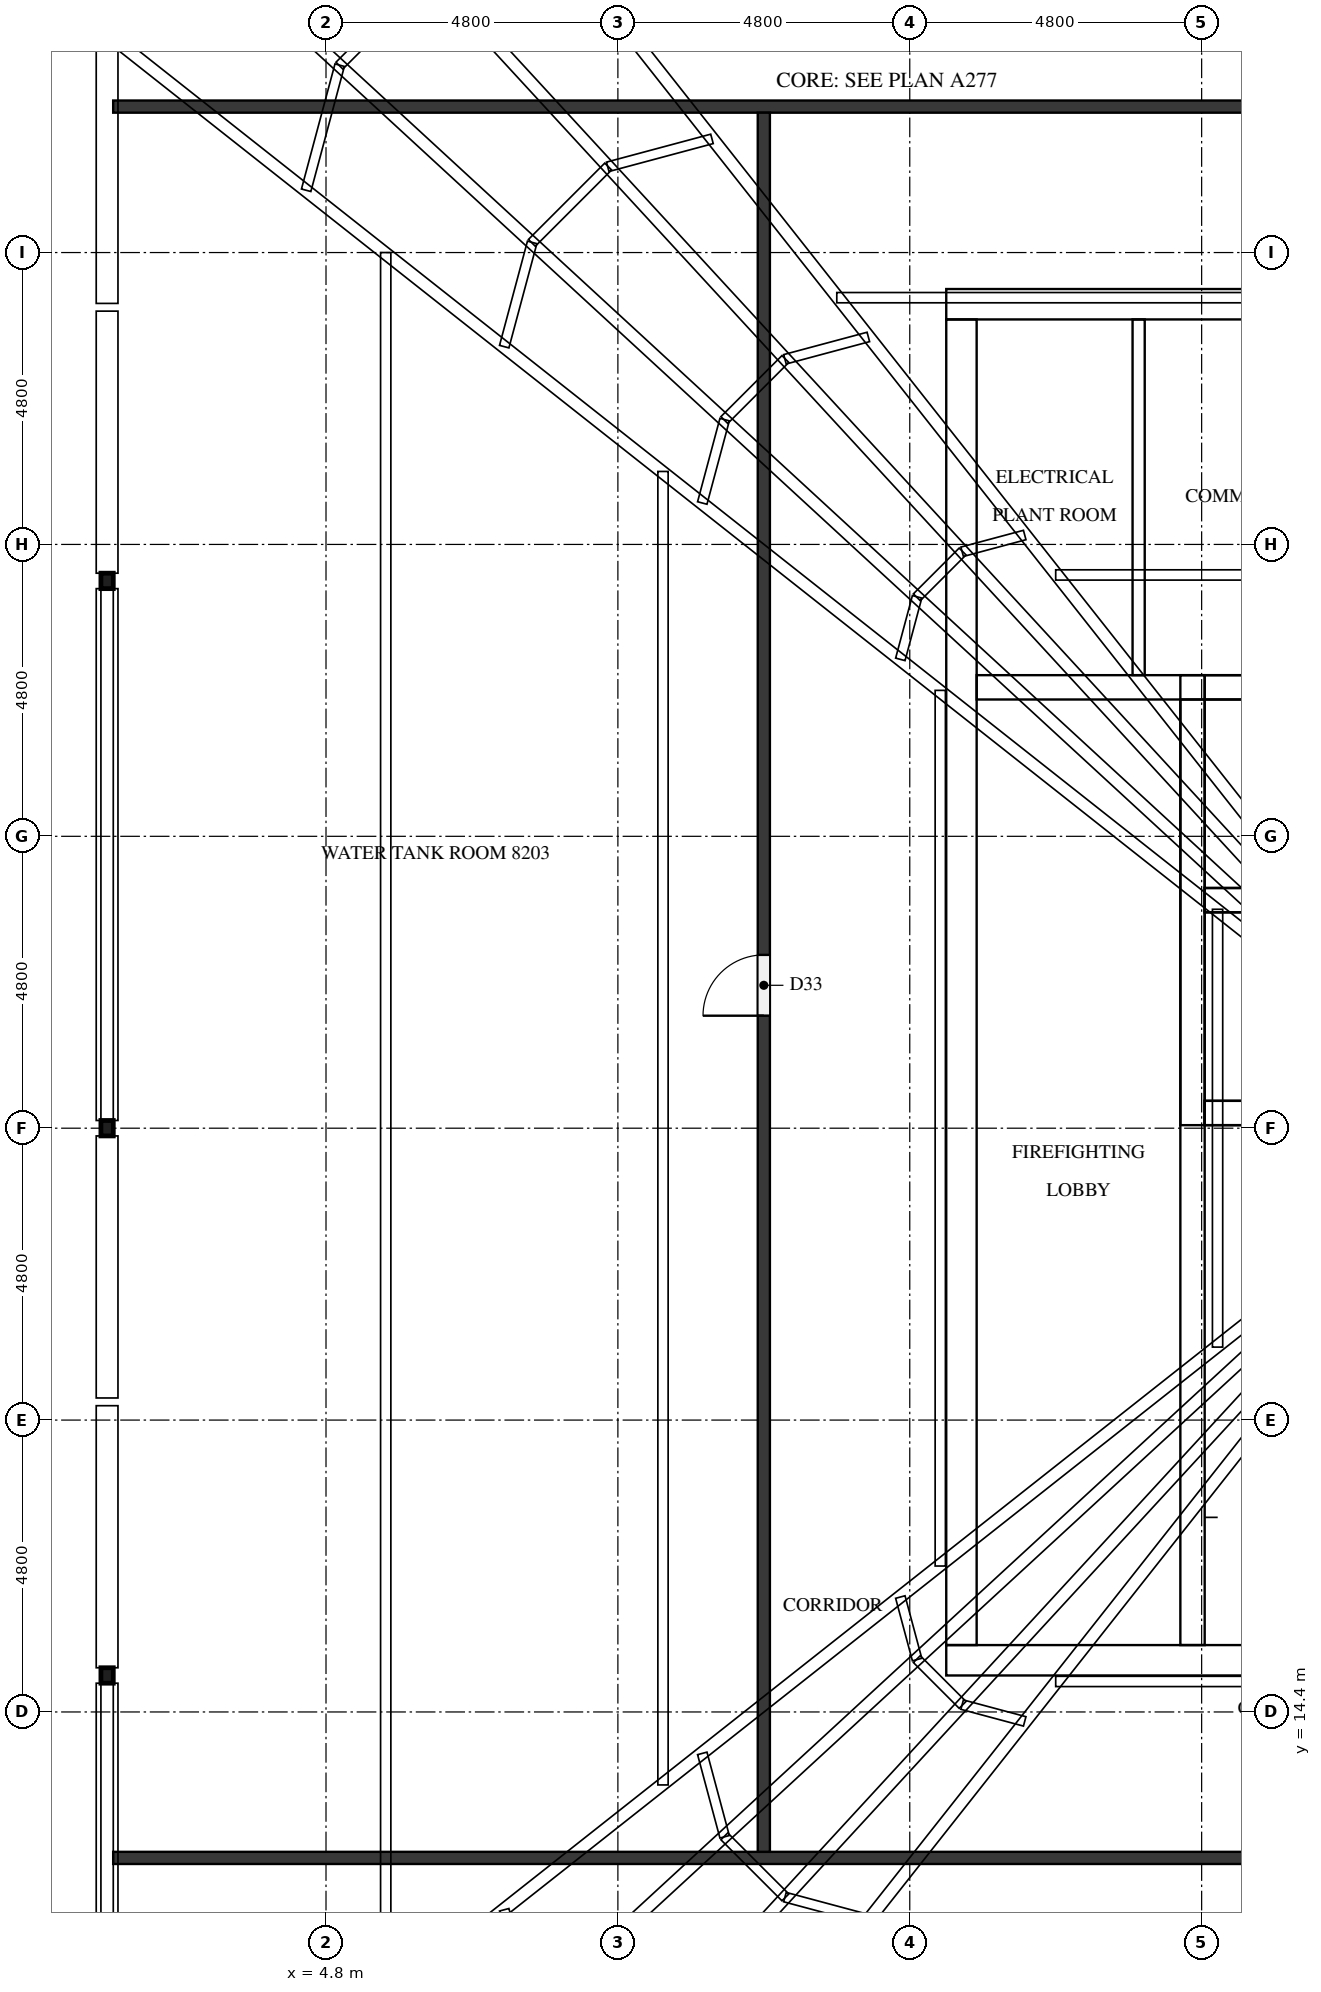
"""IFC4 building model, lengths in metres.
Left out: names, types, materials, properties, quantities, classifications, styles, units other than length and angle.
Written with IfcOpenShell. Run it as: python <this file> out.ifc"""

import sys

from ifc_helpers import new_model, si_unit, direction, frame, frame_2d, origin, origin_2d, place, context, subcontext, project, spatial, rectangle, hollow_rectangle, extrude, element, fill, save


model = new_model("IFC4")
c1 = context("Model", 3, precision=1e-05, world=origin(), true_north=direction((0.0, 1.0)))
c2 = subcontext(c1, "Body", "Model", "MODEL_VIEW")
j1 = project(units=[si_unit("LENGTHUNIT", "METRE"), si_unit("PLANEANGLEUNIT", "RADIAN")], contexts=[c1])
p1 = place(None, origin())
s1 = spatial("IfcSite", under=j1, at=p1, CompositionType="ELEMENT")
p2 = place(p1, origin())
s2 = spatial("IfcBuilding", under=s1, at=p2, CompositionType="ELEMENT")
p3 = place(p2, frame((0.0, 0.0, 317.3)))
s3 = spatial("IfcBuildingStorey", under=s2, at=p3, CompositionType="ELEMENT", Elevation=317.3)
p4 = place(p3, frame((15.0, 15.25, 0.0), z_axis=(0.0, 0.0, 1.0), x_axis=(1.0, 0.0, 0.0)))
e1 = element("IfcWall", 1, at=p4, inside=s3, PredefinedType="SHEAR", context=c2, shape_type="SweptSolid", body=[
    extrude(rectangle(XDim=32.4, YDim=0.5, at=frame_2d((16.2, 0.0))), origin(), (0.0, 0.0, 1.0), 3.0),
])
p5 = place(p4, frame((15.3, 0.0, 0.0)))
e2 = element("IfcOpeningElement", 2, at=p5, cuts=e1, PredefinedType="OPENING", context=c2, shape_type="SweptSolid", body=[
    extrude(rectangle(XDim=1.8, YDim=2.1, at=frame_2d((0.9, 1.05))), frame((0.0, 0.26, 0.0), z_axis=(0.0, -1.0, 0.0), x_axis=(1.0, 0.0, 0.0)), (0.0, 0.0, 1.0), 0.52),
])
p6 = place(p3, frame((15.0, 37.55, 0.0), z_axis=(0.0, 0.0, 1.0), x_axis=(1.0, 0.0, 0.0)))
e3 = element("IfcWall", 3, at=p6, inside=s3, PredefinedType="SHEAR", context=c2, shape_type="SweptSolid", body=[
    extrude(rectangle(XDim=32.4, YDim=0.5, at=frame_2d((16.2, 0.0))), origin(), (0.0, 0.0, 1.0), 3.0),
])
p7 = place(p6, frame((15.3, 0.0, 0.0)))
e4 = element("IfcOpeningElement", 4, at=p7, cuts=e3, PredefinedType="OPENING", context=c2, shape_type="SweptSolid", body=[
    extrude(rectangle(XDim=1.8, YDim=2.1, at=frame_2d((0.9, 1.05))), frame((0.0, 0.26, 0.0), z_axis=(0.0, -1.0, 0.0), x_axis=(1.0, 0.0, 0.0)), (0.0, 0.0, 1.0), 0.52),
])
p8 = place(p6, frame((1.282, 0.0, 0.0)))
e5 = element("IfcOpeningElement", 5, at=p8, cuts=e3, PredefinedType="OPENING", context=c2, shape_type="SweptSolid", body=[
    extrude(rectangle(XDim=1.0, YDim=2.1, at=frame_2d((0.5, 1.05))), frame((0.0, 0.26, 0.0), z_axis=(0.0, -1.0, 0.0), x_axis=(1.0, 0.0, 0.0)), (0.0, 0.0, 1.0), 0.52),
])
p9 = place(p6, frame((5.082, 0.0, 0.0)))
e6 = element("IfcOpeningElement", 6, at=p9, cuts=e3, PredefinedType="OPENING", context=c2, shape_type="SweptSolid", body=[
    extrude(rectangle(XDim=1.0, YDim=2.1, at=frame_2d((0.5, 1.05))), frame((0.0, 0.26, 0.0), z_axis=(0.0, -1.0, 0.0), x_axis=(1.0, 0.0, 0.0)), (0.0, 0.0, 1.0), 0.52),
])
p10 = place(p3, frame((15.25, 15.5, 0.0), z_axis=(0.0, 0.0, 1.0), x_axis=(0.0, 1.0, 0.0)))
e7 = element("IfcWall", 7, at=p10, inside=s3, PredefinedType="SHEAR", context=c2, shape_type="SweptSolid", body=[
    extrude(rectangle(XDim=21.8, YDim=0.5, at=frame_2d((10.9, 0.0))), origin(), (0.0, 0.0, 1.0), 3.0),
])
p11 = place(p10, frame((5.26, 0.0, 0.0)))
e8 = element("IfcOpeningElement", 8, at=p11, cuts=e7, PredefinedType="OPENING", context=c2, shape_type="SweptSolid", body=[
    extrude(rectangle(XDim=1.2, YDim=2.1, at=frame_2d((0.6, 1.05))), frame((0.0, 0.26, 0.0), z_axis=(0.0, -1.0, 0.0), x_axis=(1.0, 0.0, 0.0)), (0.0, 0.0, 1.0), 0.52),
])
p12 = place(p3, frame((19.05, 15.5, 0.0), z_axis=(0.0, 0.0, 1.0), x_axis=(0.0, 1.0, 0.0)))
e9 = element("IfcWall", 9, at=p12, inside=s3, PredefinedType="SHEAR", context=c2, shape_type="SweptSolid", body=[
    extrude(rectangle(XDim=15.55, YDim=0.4, at=frame_2d((7.775, 0.0))), origin(), (0.0, 0.0, 1.0), 3.0),
])
p13 = place(p12, frame((9.95, 0.0, 0.0)))
e10 = element("IfcOpeningElement", 10, at=p13, cuts=e9, PredefinedType="OPENING", context=c2, shape_type="SweptSolid", body=[
    extrude(rectangle(XDim=1.1, YDim=2.1, at=frame_2d((0.55, 1.05))), frame((0.0, 0.21, 0.0), z_axis=(0.0, -1.0, 0.0), x_axis=(1.0, 0.0, 0.0)), (0.0, 0.0, 1.0), 0.42),
])
p14 = place(p12, frame((13.45, 0.0, 0.0)))
e11 = element("IfcOpeningElement", 11, at=p14, cuts=e9, PredefinedType="OPENING", context=c2, shape_type="SweptSolid", body=[
    extrude(rectangle(XDim=1.1, YDim=2.1, at=frame_2d((0.55, 1.05))), frame((0.0, 0.21, 0.0), z_axis=(0.0, -1.0, 0.0), x_axis=(1.0, 0.0, 0.0)), (0.0, 0.0, 1.0), 0.42),
])
p15 = place(p12, frame((0.7, 0.0, 0.0)))
e12 = element("IfcOpeningElement", 12, at=p15, cuts=e9, PredefinedType="OPENING", context=c2, shape_type="SweptSolid", body=[
    extrude(rectangle(XDim=1.2, YDim=2.1, at=frame_2d((0.6, 1.05))), frame((0.0, 0.21, 0.0), z_axis=(0.0, -1.0, 0.0), x_axis=(1.0, 0.0, 0.0)), (0.0, 0.0, 1.0), 0.42),
])
for number, where, z_axis, x_axis in (
    (13, (19.25, 24.25, 0.0), (0.0, 0.0, 1.0), (1.0, 0.0, 0.0)),
    (14, (19.25, 27.75, 0.0), (0.0, 0.0, 1.0), (1.0, 0.0, 0.0)),
):
    element("IfcWall", number, at=place(p3, frame(where, z_axis=z_axis, x_axis=x_axis)), inside=s3, PredefinedType="SHEAR", context=c2, shape_type="SweptSolid", body=[
        extrude(rectangle(XDim=3.65, YDim=0.4, at=frame_2d((1.825, 0.0))), origin(), (0.0, 0.0, 1.0), 3.0),
    ])
p16 = place(p3, frame((15.5, 31.25, 0.0), z_axis=(0.0, 0.0, 1.0), x_axis=(1.0, 0.0, 0.0)))
e15 = element("IfcWall", 15, at=p16, inside=s3, PredefinedType="SHEAR", context=c2, shape_type="SweptSolid", body=[
    extrude(rectangle(XDim=7.4, YDim=0.4, at=frame_2d((3.7, 0.0))), origin(), (0.0, 0.0, 1.0), 3.0),
])
p17 = place(p3, frame((19.05, 24.05, 3.0), z_axis=(0.0, 0.0, 1.0), x_axis=(0.0, 1.0, 0.0)))
e16 = element("IfcWall", 16, at=p17, inside=s3, PredefinedType="SHEAR", context=c2, shape_type="SweptSolid", body=[
    extrude(rectangle(XDim=7.4, YDim=0.4, at=frame_2d((3.7, 0.0))), origin(), (0.0, 0.0, 1.0), 1.5),
])
for number, where, z_axis, x_axis in (
    (17, (19.25, 24.25, 3.0), (0.0, 0.0, 1.0), (1.0, 0.0, 0.0)),
    (18, (19.25, 27.75, 3.0), (0.0, 0.0, 1.0), (1.0, 0.0, 0.0)),
    (19, (19.25, 31.25, 3.0), (0.0, 0.0, 1.0), (1.0, 0.0, 0.0)),
):
    element("IfcWall", number, at=place(p3, frame(where, z_axis=z_axis, x_axis=x_axis)), inside=s3, PredefinedType="SHEAR", context=c2, shape_type="SweptSolid", body=[
        extrude(rectangle(XDim=3.65, YDim=0.4, at=frame_2d((1.825, 0.0))), origin(), (0.0, 0.0, 1.0), 1.5),
    ])
for number, where, z_axis, x_axis in (
    (20, (1.2, 33.0, 0.0), (0.0, 0.0, 1.0), (1.0, 0.0, 0.0)),
    (21, (1.2, 24.0, 0.0), (0.0, 0.0, 1.0), (1.0, 0.0, 0.0)),
    (22, (1.2, 15.0, 0.0), (0.0, 0.0, 1.0), (1.0, 0.0, 0.0)),
):
    element("IfcColumn", number, at=place(p3, frame(where, z_axis=z_axis, x_axis=x_axis)), inside=s3, PredefinedType="COLUMN", context=c2, shape_type="SweptSolid", body=[
        extrude(hollow_rectangle(XDim=0.203, YDim=0.254, WallThickness=0.01, InnerFilletRadius=0.004, OuterFilletRadius=0.013, at=origin_2d()), origin(), (0.0, 0.0, 1.0), 3.0),
    ])
p18 = place(p3, frame((18.164, 31.45, 0.0), z_axis=(0.0, 0.0, 1.0), x_axis=(0.0, 1.0, 0.0)))
e23 = element("IfcWall", 23, at=p18, inside=s3, PredefinedType="PARTITIONING", context=c2, shape_type="SweptSolid", body=[
    extrude(rectangle(XDim=5.85, YDim=0.2, at=frame_2d((2.925, 0.0))), origin(), (0.0, 0.0, 1.0), 3.0),
])
p19 = place(p3, frame((56.3, 12.0, 0.0), z_axis=(0.0, 0.0, 1.0), x_axis=(-1.0, 0.0, 0.0)))
e24 = element("IfcWall", 24, at=p19, inside=s3, PredefinedType="PARTITIONING", context=c2, shape_type="SweptSolid", body=[
    extrude(rectangle(XDim=55.0, YDim=0.2, at=frame_2d((27.5, 0.0))), origin(), (0.0, 0.0, 1.0), 3.0),
])
p20 = place(p19, frame((24.55, 0.0, 0.0)))
e25 = element("IfcOpeningElement", 25, at=p20, cuts=e24, PredefinedType="OPENING", context=c2, shape_type="SweptSolid", body=[
    extrude(rectangle(XDim=1.0, YDim=2.1, at=frame_2d((0.5, 1.05))), frame((0.0, 0.11, 0.0), z_axis=(0.0, -1.0, 0.0), x_axis=(1.0, 0.0, 0.0)), (0.0, 0.0, 1.0), 0.22),
])
p21 = place(p3, frame((1.3, 40.8, 0.0), z_axis=(0.0, 0.0, 1.0), x_axis=(1.0, 0.0, 0.0)))
e26 = element("IfcWall", 26, at=p21, inside=s3, PredefinedType="PARTITIONING", context=c2, shape_type="SweptSolid", body=[
    extrude(rectangle(XDim=55.0, YDim=0.2, at=frame_2d((27.5, 0.0))), origin(), (0.0, 0.0, 1.0), 3.0),
])
p22 = place(p21, frame((29.35, 0.0, 0.0)))
e27 = element("IfcOpeningElement", 27, at=p22, cuts=e26, PredefinedType="OPENING", context=c2, shape_type="SweptSolid", body=[
    extrude(rectangle(XDim=1.0, YDim=2.1, at=frame_2d((0.5, 1.05))), frame((0.0, 0.11, 0.0), z_axis=(0.0, -1.0, 0.0), x_axis=(1.0, 0.0, 0.0)), (0.0, 0.0, 1.0), 0.22),
])
p23 = place(p3, frame((12.0, 12.1, 0.0), z_axis=(0.0, 0.0, 1.0), x_axis=(0.0, 1.0, 0.0)))
e28 = element("IfcWall", 28, at=p23, inside=s3, PredefinedType="PARTITIONING", context=c2, shape_type="SweptSolid", body=[
    extrude(rectangle(XDim=28.6, YDim=0.2, at=frame_2d((14.3, 0.0))), origin(), (0.0, 0.0, 1.0), 3.0),
])
p24 = place(p23, frame((13.75, 0.0, 0.0)))
e29 = element("IfcOpeningElement", 29, at=p24, cuts=e28, PredefinedType="OPENING", context=c2, shape_type="SweptSolid", body=[
    extrude(rectangle(XDim=1.0, YDim=2.1, at=frame_2d((0.5, 1.05))), frame((0.0, 0.11, 0.0), z_axis=(0.0, -1.0, 0.0), x_axis=(1.0, 0.0, 0.0)), (0.0, 0.0, 1.0), 0.22),
])
p25 = place(p13, origin())
e30 = element("IfcDoor", 30, at=p25, inside=s3, OperationType="DOUBLE_DOOR_SLIDING", PredefinedType="DOOR", context=c2, shape_type="SweptSolid", body=[
    extrude(rectangle(XDim=1.1, YDim=2.1, at=frame_2d((0.55, 1.05))), frame((0.0, 0.025, 0.0), z_axis=(0.0, -1.0, 0.0), x_axis=(1.0, 0.0, 0.0)), (0.0, 0.0, 1.0), 0.05),
])
fill(e10, e30)
p26 = place(p14, origin())
e31 = element("IfcDoor", 31, at=p26, inside=s3, OperationType="DOUBLE_DOOR_SLIDING", PredefinedType="DOOR", context=c2, shape_type="SweptSolid", body=[
    extrude(rectangle(XDim=1.1, YDim=2.1, at=frame_2d((0.55, 1.05))), frame((0.0, 0.025, 0.0), z_axis=(0.0, -1.0, 0.0), x_axis=(1.0, 0.0, 0.0)), (0.0, 0.0, 1.0), 0.05),
])
fill(e11, e31)
p27 = place(p15, frame((1.2, 0.0, 0.0), z_axis=(0.0, 0.0, 1.0), x_axis=(-1.0, 0.0, 0.0)))
e32 = element("IfcDoor", 32, at=p27, inside=s3, OperationType="SINGLE_SWING_RIGHT", PredefinedType="DOOR", context=c2, shape_type="SweptSolid", body=[
    extrude(rectangle(XDim=1.2, YDim=2.1, at=frame_2d((0.6, 1.05))), frame((0.0, 0.025, 0.0), z_axis=(0.0, -1.0, 0.0), x_axis=(1.0, 0.0, 0.0)), (0.0, 0.0, 1.0), 0.05),
])
fill(e12, e32)
p28 = place(p11, frame((1.2, 0.0, 0.0), z_axis=(0.0, 0.0, 1.0), x_axis=(-1.0, 0.0, 0.0)))
e33 = element("IfcDoor", 33, at=p28, inside=s3, OperationType="SINGLE_SWING_LEFT", PredefinedType="DOOR", context=c2, shape_type="SweptSolid", body=[
    extrude(rectangle(XDim=1.2, YDim=2.1, at=frame_2d((0.6, 1.05))), frame((0.0, 0.025, 0.0), z_axis=(0.0, -1.0, 0.0), x_axis=(1.0, 0.0, 0.0)), (0.0, 0.0, 1.0), 0.05),
])
fill(e8, e33)
p29 = place(p8, origin())
e34 = element("IfcDoor", 34, at=p29, inside=s3, OperationType="SINGLE_SWING_LEFT", PredefinedType="DOOR", context=c2, shape_type="SweptSolid", body=[
    extrude(rectangle(XDim=1.0, YDim=2.1, at=frame_2d((0.5, 1.05))), frame((0.0, 0.025, 0.0), z_axis=(0.0, -1.0, 0.0), x_axis=(1.0, 0.0, 0.0)), (0.0, 0.0, 1.0), 0.05),
])
fill(e5, e34)
p30 = place(p24, origin())
e35 = element("IfcDoor", 35, at=p30, inside=s3, OperationType="SINGLE_SWING_LEFT", PredefinedType="DOOR", context=c2, shape_type="SweptSolid", body=[
    extrude(rectangle(XDim=1.0, YDim=2.1, at=frame_2d((0.5, 1.05))), frame((0.0, 0.025, 0.0), z_axis=(0.0, -1.0, 0.0), x_axis=(1.0, 0.0, 0.0)), (0.0, 0.0, 1.0), 0.05),
])
fill(e29, e35)
save(model, sys.argv[1])
